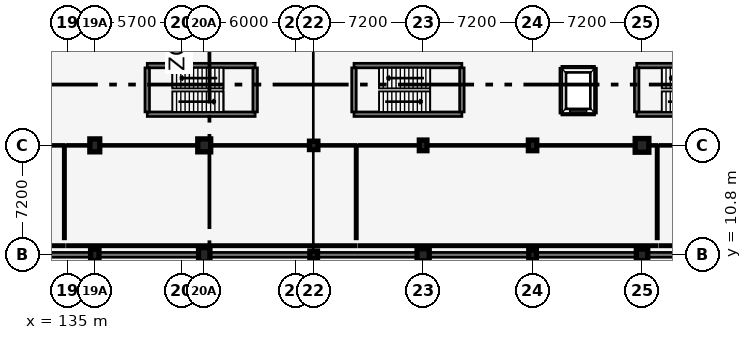
"""IFC4 building model, lengths in metres.
Left out: names, types, materials, properties, quantities, classifications, styles, units other than length and angle.
Written with IfcOpenShell. Run it as: python <this file> out.ifc"""

import sys

from ifc_helpers import new_model, si_unit, direction, frame, frame_2d, origin, origin_2d, place, context, subcontext, project, spatial, rectangle, circle, extrude, element, fill, save


model = new_model("IFC4")
c1 = context("Model", 3, precision=1e-05, world=origin(), true_north=direction((0.0, 1.0)))
c2 = subcontext(c1, "Body", "Model", "MODEL_VIEW")
j1 = project(units=[si_unit("LENGTHUNIT", "METRE"), si_unit("PLANEANGLEUNIT", "RADIAN")], contexts=[c1])
p1 = place(None, origin())
s1 = spatial("IfcSite", under=j1, at=p1, CompositionType="ELEMENT")
p2 = place(p1, origin())
s2 = spatial("IfcBuilding", under=s1, at=p2, CompositionType="ELEMENT")
p3 = place(p2, origin())
s3 = spatial("IfcBuildingStorey", under=s2, at=p3, CompositionType="ELEMENT", Elevation=0.0)
p4 = place(p3, frame((136.8, 10.8, 0.0), z_axis=(0.0, 0.0, 1.0), x_axis=(1.0, 0.0, 0.0)))
e1 = element("IfcColumn", 1, at=p4, inside=s3, PredefinedType="COLUMN", context=c2, shape_type="SweptSolid", body=[
    extrude(rectangle(XDim=0.55, YDim=0.75, at=origin_2d()), origin(), (0.0, 0.0, 1.0), 4.8),
])
p5 = place(p3, frame((136.8, 18.0, 0.0), z_axis=(0.0, 0.0, 1.0), x_axis=(1.0, 0.0, 0.0)))
e2 = element("IfcColumn", 2, at=p5, inside=s3, PredefinedType="COLUMN", context=c2, shape_type="SweptSolid", body=[
    extrude(rectangle(XDim=0.65, YDim=0.85, at=origin_2d()), origin(), (0.0, 0.0, 1.0), 4.8),
])
p6 = place(p3, frame((144.0, 10.8, 0.0), z_axis=(0.0, 0.0, 1.0), x_axis=(1.0, 0.0, 0.0)))
e3 = element("IfcColumn", 3, at=p6, inside=s3, PredefinedType="COLUMN", context=c2, shape_type="SweptSolid", body=[
    extrude(rectangle(XDim=0.75, YDim=0.95, at=origin_2d()), origin(), (0.0, 0.0, 1.0), 4.8),
])
p7 = place(p3, frame((144.0, 18.0, 0.0), z_axis=(0.0, 0.0, 1.0), x_axis=(1.0, 0.0, 0.0)))
e4 = element("IfcColumn", 4, at=p7, inside=s3, PredefinedType="COLUMN", context=c2, shape_type="SweptSolid", body=[
    extrude(rectangle(XDim=0.85, YDim=0.85, at=origin_2d()), origin(), (0.0, 0.0, 1.0), 4.8),
])
p8 = place(p3, frame((151.2, 10.8, 0.0), z_axis=(0.0, 0.0, 1.0), x_axis=(1.0, 0.0, 0.0)))
e5 = element("IfcColumn", 5, at=p8, inside=s3, PredefinedType="COLUMN", context=c2, shape_type="SweptSolid", body=[
    extrude(rectangle(XDim=0.5, YDim=0.5, at=origin_2d()), origin(), (0.0, 0.0, 1.0), 4.8),
])
p9 = place(p3, frame((151.2, 18.0, 0.0), z_axis=(0.0, 0.0, 1.0), x_axis=(1.0, 0.0, 0.0)))
e6 = element("IfcColumn", 6, at=p9, inside=s3, PredefinedType="COLUMN", context=c2, shape_type="SweptSolid", body=[
    extrude(rectangle(XDim=0.55, YDim=0.55, at=origin_2d()), origin(), (0.0, 0.0, 1.0), 4.8),
])
p10 = place(p3, frame((158.4, 10.8, 0.0), z_axis=(0.0, 0.0, 1.0), x_axis=(1.0, 0.0, 0.0)))
e7 = element("IfcColumn", 7, at=p10, inside=s3, PredefinedType="COLUMN", context=c2, shape_type="SweptSolid", body=[
    extrude(rectangle(XDim=0.8, YDim=0.8, at=origin_2d()), origin(), (0.0, 0.0, 1.0), 4.8),
])
p11 = place(p3, frame((158.4, 18.0, 0.0), z_axis=(0.0, 0.0, 1.0), x_axis=(1.0, 0.0, 0.0)))
e8 = element("IfcColumn", 8, at=p11, inside=s3, PredefinedType="COLUMN", context=c2, shape_type="SweptSolid", body=[
    extrude(rectangle(XDim=0.5, YDim=0.7, at=origin_2d()), origin(), (0.0, 0.0, 1.0), 4.8),
])
p12 = place(p3, frame((165.6, 10.8, 0.0), z_axis=(0.0, 0.0, 1.0), x_axis=(1.0, 0.0, 0.0)))
e9 = element("IfcColumn", 9, at=p12, inside=s3, PredefinedType="COLUMN", context=c2, shape_type="SweptSolid", body=[
    extrude(rectangle(XDim=0.5, YDim=0.65, at=origin_2d()), origin(), (0.0, 0.0, 1.0), 4.8),
])
p13 = place(p3, frame((165.6, 18.0, 0.0), z_axis=(0.0, 0.0, 1.0), x_axis=(1.0, 0.0, 0.0)))
e10 = element("IfcColumn", 10, at=p13, inside=s3, PredefinedType="COLUMN", context=c2, shape_type="SweptSolid", body=[
    extrude(rectangle(XDim=0.55, YDim=0.7, at=origin_2d()), origin(), (0.0, 0.0, 1.0), 4.8),
])
p14 = place(p3, frame((172.8, 10.8, 0.0), z_axis=(0.0, 0.0, 1.0), x_axis=(1.0, 0.0, 0.0)))
e11 = element("IfcColumn", 11, at=p14, inside=s3, PredefinedType="COLUMN", context=c2, shape_type="SweptSolid", body=[
    extrude(circle(Radius=0.375, at=origin_2d()), origin(), (0.0, 0.0, 1.0), 4.8),
])
p15 = place(p3, frame((172.8, 18.0, 0.0), z_axis=(0.0, 0.0, 1.0), x_axis=(1.0, 0.0, 0.0)))
e12 = element("IfcColumn", 12, at=p15, inside=s3, PredefinedType="COLUMN", context=c2, shape_type="SweptSolid", body=[
    extrude(circle(Radius=0.45, at=origin_2d()), origin(), (0.0, 0.0, 1.0), 4.8),
])
p16 = place(p3, frame((108.0, 10.8, 0.0), z_axis=(0.0, 0.0, 1.0), x_axis=(1.0, 0.0, 0.0)))
e13 = element("IfcWall", 13, at=p16, inside=s3, PredefinedType="SOLIDWALL", context=c2, shape_type="SweptSolid", body=[
    extrude(rectangle(XDim=79.2, YDim=0.32, at=frame_2d((39.6, 0.0))), origin(), (0.0, 0.0, 1.0), 4.25),
])
p17 = place(p16, frame((2.2, 0.0, 0.72)))
e14 = element("IfcOpeningElement", 14, at=p17, cuts=e13, PredefinedType="OPENING", context=c2, shape_type="SweptSolid", body=[
    extrude(rectangle(XDim=1.8, YDim=2.15, at=frame_2d((0.9, 1.075))), frame((0.0, 0.17, 0.0), z_axis=(0.0, -1.0, 0.0), x_axis=(1.0, 0.0, 0.0)), (0.0, 0.0, 1.0), 0.34),
])
p18 = place(p16, frame((9.4, 0.0, 0.72)))
e15 = element("IfcOpeningElement", 15, at=p18, cuts=e13, PredefinedType="OPENING", context=c2, shape_type="SweptSolid", body=[
    extrude(rectangle(XDim=1.2, YDim=2.0, at=frame_2d((0.6, 1.0))), frame((0.0, 0.17, 0.0), z_axis=(0.0, -1.0, 0.0), x_axis=(1.0, 0.0, 0.0)), (0.0, 0.0, 1.0), 0.34),
])
p19 = place(p16, frame((16.6, 0.0, 0.72)))
e16 = element("IfcOpeningElement", 16, at=p19, cuts=e13, PredefinedType="OPENING", context=c2, shape_type="SweptSolid", body=[
    extrude(rectangle(XDim=1.35, YDim=2.05, at=frame_2d((0.675, 1.025))), frame((0.0, 0.17, 0.0), z_axis=(0.0, -1.0, 0.0), x_axis=(1.0, 0.0, 0.0)), (0.0, 0.0, 1.0), 0.34),
])
p20 = place(p16, frame((23.8, 0.0, 0.72)))
e17 = element("IfcOpeningElement", 17, at=p20, cuts=e13, PredefinedType="OPENING", context=c2, shape_type="SweptSolid", body=[
    extrude(rectangle(XDim=1.5, YDim=2.1, at=frame_2d((0.75, 1.05))), frame((0.0, 0.17, 0.0), z_axis=(0.0, -1.0, 0.0), x_axis=(1.0, 0.0, 0.0)), (0.0, 0.0, 1.0), 0.34),
])
p21 = place(p16, frame((31.0, 0.0, 0.72)))
e18 = element("IfcOpeningElement", 18, at=p21, cuts=e13, PredefinedType="OPENING", context=c2, shape_type="SweptSolid", body=[
    extrude(rectangle(XDim=1.65, YDim=2.1, at=frame_2d((0.825, 1.05))), frame((0.0, 0.17, 0.0), z_axis=(0.0, -1.0, 0.0), x_axis=(1.0, 0.0, 0.0)), (0.0, 0.0, 1.0), 0.34),
])
p22 = place(p16, frame((38.2, 0.0, 0.72)))
e19 = element("IfcOpeningElement", 19, at=p22, cuts=e13, PredefinedType="OPENING", context=c2, shape_type="SweptSolid", body=[
    extrude(rectangle(XDim=1.8, YDim=2.15, at=frame_2d((0.9, 1.075))), frame((0.0, 0.17, 0.0), z_axis=(0.0, -1.0, 0.0), x_axis=(1.0, 0.0, 0.0)), (0.0, 0.0, 1.0), 0.34),
])
p23 = place(p16, frame((45.4, 0.0, 0.72)))
e20 = element("IfcOpeningElement", 20, at=p23, cuts=e13, PredefinedType="OPENING", context=c2, shape_type="SweptSolid", body=[
    extrude(rectangle(XDim=1.2, YDim=2.0, at=frame_2d((0.6, 1.0))), frame((0.0, 0.17, 0.0), z_axis=(0.0, -1.0, 0.0), x_axis=(1.0, 0.0, 0.0)), (0.0, 0.0, 1.0), 0.34),
])
p24 = place(p16, frame((52.6, 0.0, 0.72)))
e21 = element("IfcOpeningElement", 21, at=p24, cuts=e13, PredefinedType="OPENING", context=c2, shape_type="SweptSolid", body=[
    extrude(rectangle(XDim=1.35, YDim=2.05, at=frame_2d((0.675, 1.025))), frame((0.0, 0.17, 0.0), z_axis=(0.0, -1.0, 0.0), x_axis=(1.0, 0.0, 0.0)), (0.0, 0.0, 1.0), 0.34),
])
p25 = place(p16, frame((59.8, 0.0, 0.72)))
e22 = element("IfcOpeningElement", 22, at=p25, cuts=e13, PredefinedType="OPENING", context=c2, shape_type="SweptSolid", body=[
    extrude(rectangle(XDim=1.5, YDim=2.1, at=frame_2d((0.75, 1.05))), frame((0.0, 0.17, 0.0), z_axis=(0.0, -1.0, 0.0), x_axis=(1.0, 0.0, 0.0)), (0.0, 0.0, 1.0), 0.34),
])
p26 = place(p16, frame((67.0, 0.0, 0.72)))
e23 = element("IfcOpeningElement", 23, at=p26, cuts=e13, PredefinedType="OPENING", context=c2, shape_type="SweptSolid", body=[
    extrude(rectangle(XDim=1.65, YDim=2.1, at=frame_2d((0.825, 1.05))), frame((0.0, 0.17, 0.0), z_axis=(0.0, -1.0, 0.0), x_axis=(1.0, 0.0, 0.0)), (0.0, 0.0, 1.0), 0.34),
])
p27 = place(p3, frame((140.25, 20.05, 0.0), z_axis=(0.0, 0.0, 1.0), x_axis=(1.0, 0.0, 0.0)))
e24 = element("IfcWall", 24, at=p27, inside=s3, PredefinedType="SHEAR", context=c2, shape_type="SweptSolid", body=[
    extrude(rectangle(XDim=7.1, YDim=0.3, at=frame_2d((3.55, 0.0))), origin(), (0.0, 0.0, 1.0), 4.525),
])
p28 = place(p27, frame((0.35, 0.0, 0.0)))
e25 = element("IfcOpeningElement", 25, at=p28, cuts=e24, PredefinedType="OPENING", context=c2, shape_type="SweptSolid", body=[
    extrude(rectangle(XDim=1.05, YDim=2.15, at=frame_2d((0.525, 1.075))), frame((0.0, 0.16, 0.0), z_axis=(0.0, -1.0, 0.0), x_axis=(1.0, 0.0, 0.0)), (0.0, 0.0, 1.0), 0.32),
])
p29 = place(p3, frame((147.35, 23.25, 0.0), z_axis=(0.0, 0.0, 1.0), x_axis=(-1.0, 0.0, 0.0)))
e26 = element("IfcWall", 26, at=p29, inside=s3, PredefinedType="SHEAR", context=c2, shape_type="SweptSolid", body=[
    extrude(rectangle(XDim=7.1, YDim=0.3, at=frame_2d((3.55, 0.0))), origin(), (0.0, 0.0, 1.0), 4.525),
])
for number, where, z_axis, x_axis in (
    (27, (147.35, 20.2, 0.0), (0.0, 0.0, 1.0), (0.0, 1.0, 0.0)),
    (28, (140.25, 23.1, 0.0), (0.0, 0.0, 1.0), (0.0, -1.0, 0.0)),
):
    element("IfcWall", number, at=place(p3, frame(where, z_axis=z_axis, x_axis=x_axis)), inside=s3, PredefinedType="SHEAR", context=c2, shape_type="SweptSolid", body=[
        extrude(rectangle(XDim=2.9, YDim=0.3, at=frame_2d((1.45, 0.0))), origin(), (0.0, 0.0, 1.0), 4.525),
    ])
p30 = place(p3, frame((153.85, 20.05, 0.0), z_axis=(0.0, 0.0, 1.0), x_axis=(1.0, 0.0, 0.0)))
e29 = element("IfcWall", 29, at=p30, inside=s3, PredefinedType="SHEAR", context=c2, shape_type="SweptSolid", body=[
    extrude(rectangle(XDim=7.1, YDim=0.3, at=frame_2d((3.55, 0.0))), origin(), (0.0, 0.0, 1.0), 4.525),
])
p31 = place(p30, frame((0.35, 0.0, 0.0)))
e30 = element("IfcOpeningElement", 30, at=p31, cuts=e29, PredefinedType="OPENING", context=c2, shape_type="SweptSolid", body=[
    extrude(rectangle(XDim=1.05, YDim=2.15, at=frame_2d((0.525, 1.075))), frame((0.0, 0.16, 0.0), z_axis=(0.0, -1.0, 0.0), x_axis=(1.0, 0.0, 0.0)), (0.0, 0.0, 1.0), 0.32),
])
p32 = place(p3, frame((160.95, 23.25, 0.0), z_axis=(0.0, 0.0, 1.0), x_axis=(-1.0, 0.0, 0.0)))
e31 = element("IfcWall", 31, at=p32, inside=s3, PredefinedType="SHEAR", context=c2, shape_type="SweptSolid", body=[
    extrude(rectangle(XDim=7.1, YDim=0.3, at=frame_2d((3.55, 0.0))), origin(), (0.0, 0.0, 1.0), 4.525),
])
for number, where, z_axis, x_axis in (
    (32, (160.95, 20.2, 0.0), (0.0, 0.0, 1.0), (0.0, 1.0, 0.0)),
    (33, (153.85, 23.1, 0.0), (0.0, 0.0, 1.0), (0.0, -1.0, 0.0)),
):
    element("IfcWall", number, at=place(p3, frame(where, z_axis=z_axis, x_axis=x_axis)), inside=s3, PredefinedType="SHEAR", context=c2, shape_type="SweptSolid", body=[
        extrude(rectangle(XDim=2.9, YDim=0.3, at=frame_2d((1.45, 0.0))), origin(), (0.0, 0.0, 1.0), 4.525),
    ])
p33 = place(p3, frame((172.45, 20.05, 0.0), z_axis=(0.0, 0.0, 1.0), x_axis=(1.0, 0.0, 0.0)))
e34 = element("IfcWall", 34, at=p33, inside=s3, PredefinedType="SHEAR", context=c2, shape_type="SweptSolid", body=[
    extrude(rectangle(XDim=7.1, YDim=0.3, at=frame_2d((3.55, 0.0))), origin(), (0.0, 0.0, 1.0), 4.525),
])
p34 = place(p33, frame((0.35, 0.0, 0.0)))
e35 = element("IfcOpeningElement", 35, at=p34, cuts=e34, PredefinedType="OPENING", context=c2, shape_type="SweptSolid", body=[
    extrude(rectangle(XDim=1.05, YDim=2.15, at=frame_2d((0.525, 1.075))), frame((0.0, 0.16, 0.0), z_axis=(0.0, -1.0, 0.0), x_axis=(1.0, 0.0, 0.0)), (0.0, 0.0, 1.0), 0.32),
])
p35 = place(p3, frame((179.55, 23.25, 0.0), z_axis=(0.0, 0.0, 1.0), x_axis=(-1.0, 0.0, 0.0)))
e36 = element("IfcWall", 36, at=p35, inside=s3, PredefinedType="SHEAR", context=c2, shape_type="SweptSolid", body=[
    extrude(rectangle(XDim=7.1, YDim=0.3, at=frame_2d((3.55, 0.0))), origin(), (0.0, 0.0, 1.0), 4.525),
])
p36 = place(p3, frame((172.45, 23.1, 0.0), z_axis=(0.0, 0.0, 1.0), x_axis=(0.0, -1.0, 0.0)))
e37 = element("IfcWall", 37, at=p36, inside=s3, PredefinedType="SHEAR", context=c2, shape_type="SweptSolid", body=[
    extrude(rectangle(XDim=2.9, YDim=0.3, at=frame_2d((1.45, 0.0))), origin(), (0.0, 0.0, 1.0), 4.525),
])
p37 = place(p3, frame((167.525, 20.125, 0.0), z_axis=(0.0, 0.0, 1.0), x_axis=(1.0, 0.0, 0.0)))
e38 = element("IfcWall", 38, at=p37, inside=s3, PredefinedType="SHEAR", context=c2, shape_type="SweptSolid", body=[
    extrude(rectangle(XDim=2.15, YDim=0.25, at=frame_2d((1.075, 0.0))), origin(), (0.0, 0.0, 1.0), 4.5),
])
p38 = place(p3, frame((169.675, 23.075, 0.0), z_axis=(0.0, 0.0, 1.0), x_axis=(-1.0, 0.0, 0.0)))
e39 = element("IfcWall", 39, at=p38, inside=s3, PredefinedType="SHEAR", context=c2, shape_type="SweptSolid", body=[
    extrude(rectangle(XDim=2.15, YDim=0.25, at=frame_2d((1.075, 0.0))), origin(), (0.0, 0.0, 1.0), 4.5),
])
p39 = place(p38, frame((0.525, 0.0, 0.0)))
e40 = element("IfcOpeningElement", 40, at=p39, cuts=e39, PredefinedType="OPENING", context=c2, shape_type="SweptSolid", body=[
    extrude(rectangle(XDim=1.1, YDim=2.15, at=frame_2d((0.55, 1.075))), frame((0.0, 0.135, 0.0), z_axis=(0.0, -1.0, 0.0), x_axis=(1.0, 0.0, 0.0)), (0.0, 0.0, 1.0), 0.27),
])
for number, where, z_axis, x_axis in (
    (41, (167.525, 23.075, 0.0), (0.0, 0.0, 1.0), (0.0, -1.0, 0.0)),
    (42, (169.675, 20.125, 0.0), (0.0, 0.0, 1.0), (0.0, 1.0, 0.0)),
):
    element("IfcWall", number, at=place(p3, frame(where, z_axis=z_axis, x_axis=x_axis)), inside=s3, PredefinedType="SHEAR", context=c2, shape_type="SweptSolid", body=[
        extrude(rectangle(XDim=2.95, YDim=0.25, at=frame_2d((1.475, 0.0))), origin(), (0.0, 0.0, 1.0), 4.5),
    ])
p40 = place(p3, frame((134.8, 11.4, 0.0), z_axis=(0.0, 0.0, 1.0), x_axis=(-1.0, 0.0, 0.0)))
e43 = element("IfcWall", 43, at=p40, inside=s3, PredefinedType="PARTITIONING", context=c2, shape_type="SweptSolid", body=[
    extrude(rectangle(XDim=16.2, YDim=0.15, at=frame_2d((8.1, 0.0))), origin(), (0.0, 0.0, 1.0), 3.557),
])
p41 = place(p3, frame((134.8, 11.85, 0.0), z_axis=(0.0, 0.0, 1.0), x_axis=(0.0, 1.0, 0.0)))
e44 = element("IfcWall", 44, at=p41, inside=s3, PredefinedType="PARTITIONING", context=c2, shape_type="SweptSolid", body=[
    extrude(rectangle(XDim=6.15, YDim=0.15, at=frame_2d((3.075, 0.0))), origin(), (0.0, 0.0, 1.0), 3.757),
])
p42 = place(p3, frame((118.6, 18.0, 0.0), z_axis=(0.0, 0.0, 1.0), x_axis=(1.0, 0.0, 0.0)))
e45 = element("IfcWall", 45, at=p42, inside=s3, PredefinedType="PARTITIONING", context=c2, shape_type="SweptSolid", body=[
    extrude(rectangle(XDim=16.2, YDim=0.125, at=frame_2d((8.1, 0.0))), origin(), (0.0, 0.0, 1.0), 3.757),
])
p43 = place(p42, frame((7.62, 0.0, 0.0)))
e46 = element("IfcOpeningElement", 46, at=p43, cuts=e45, PredefinedType="OPENING", context=c2, shape_type="SweptSolid", body=[
    extrude(rectangle(XDim=0.96, YDim=2.15, at=frame_2d((0.48, 1.075))), frame((0.0, 0.073, 0.0), z_axis=(0.0, -1.0, 0.0), x_axis=(1.0, 0.0, 0.0)), (0.0, 0.0, 1.0), 0.145),
])
p44 = place(p3, frame((154.0, 11.4, 0.0), z_axis=(0.0, 0.0, 1.0), x_axis=(-1.0, 0.0, 0.0)))
e47 = element("IfcWall", 47, at=p44, inside=s3, PredefinedType="PARTITIONING", context=c2, shape_type="SweptSolid", body=[
    extrude(rectangle(XDim=19.0, YDim=0.15, at=frame_2d((9.5, 0.0))), origin(), (0.0, 0.0, 1.0), 3.857),
])
p45 = place(p3, frame((154.0, 11.85, 0.0), z_axis=(0.0, 0.0, 1.0), x_axis=(0.0, 1.0, 0.0)))
e48 = element("IfcWall", 48, at=p45, inside=s3, PredefinedType="PARTITIONING", context=c2, shape_type="SweptSolid", body=[
    extrude(rectangle(XDim=6.15, YDim=0.15, at=frame_2d((3.075, 0.0))), origin(), (0.0, 0.0, 1.0), 3.657),
])
p46 = place(p3, frame((135.0, 18.0, 0.0), z_axis=(0.0, 0.0, 1.0), x_axis=(1.0, 0.0, 0.0)))
e49 = element("IfcWall", 49, at=p46, inside=s3, PredefinedType="PARTITIONING", context=c2, shape_type="SweptSolid", body=[
    extrude(rectangle(XDim=19.0, YDim=0.125, at=frame_2d((9.5, 0.0))), origin(), (0.0, 0.0, 1.0), 3.657),
])
p47 = place(p46, frame((5.16, 0.0, 0.0)))
e50 = element("IfcOpeningElement", 50, at=p47, cuts=e49, PredefinedType="OPENING", context=c2, shape_type="SweptSolid", body=[
    extrude(rectangle(XDim=1.8, YDim=2.2, at=frame_2d((0.9, 1.1))), frame((0.0, 0.073, 0.0), z_axis=(0.0, -1.0, 0.0), x_axis=(1.0, 0.0, 0.0)), (0.0, 0.0, 1.0), 0.145),
])
p48 = place(p3, frame((173.8, 11.4, 0.0), z_axis=(0.0, 0.0, 1.0), x_axis=(-1.0, 0.0, 0.0)))
e51 = element("IfcWall", 51, at=p48, inside=s3, PredefinedType="PARTITIONING", context=c2, shape_type="SweptSolid", body=[
    extrude(rectangle(XDim=19.6, YDim=0.15, at=frame_2d((9.8, 0.0))), origin(), (0.0, 0.0, 1.0), 3.557),
])
p49 = place(p3, frame((173.8, 11.85, 0.0), z_axis=(0.0, 0.0, 1.0), x_axis=(0.0, 1.0, 0.0)))
e52 = element("IfcWall", 52, at=p49, inside=s3, PredefinedType="PARTITIONING", context=c2, shape_type="SweptSolid", body=[
    extrude(rectangle(XDim=6.15, YDim=0.15, at=frame_2d((3.075, 0.0))), origin(), (0.0, 0.0, 1.0), 3.507),
])
p50 = place(p3, frame((154.2, 18.0, 0.0), z_axis=(0.0, 0.0, 1.0), x_axis=(1.0, 0.0, 0.0)))
e53 = element("IfcWall", 53, at=p50, inside=s3, PredefinedType="PARTITIONING", context=c2, shape_type="SweptSolid", body=[
    extrude(rectangle(XDim=19.6, YDim=0.125, at=frame_2d((9.8, 0.0))), origin(), (0.0, 0.0, 1.0), 3.507),
])
p51 = place(p50, frame((9.32, 0.0, 0.0)))
e54 = element("IfcOpeningElement", 54, at=p51, cuts=e53, PredefinedType="OPENING", context=c2, shape_type="SweptSolid", body=[
    extrude(rectangle(XDim=0.96, YDim=2.15, at=frame_2d((0.48, 1.075))), frame((0.0, 0.073, 0.0), z_axis=(0.0, -1.0, 0.0), x_axis=(1.0, 0.0, 0.0)), (0.0, 0.0, 1.0), 0.145),
])
p52 = place(p3, frame((186.2, 11.4, 0.0), z_axis=(0.0, 0.0, 1.0), x_axis=(-1.0, 0.0, 0.0)))
e55 = element("IfcWall", 55, at=p52, inside=s3, PredefinedType="PARTITIONING", context=c2, shape_type="SweptSolid", body=[
    extrude(rectangle(XDim=12.2, YDim=0.15, at=frame_2d((6.1, 0.0))), origin(), (0.0, 0.0, 1.0), 3.657),
])
p53 = place(p3, frame((174.0, 18.0, 0.0), z_axis=(0.0, 0.0, 1.0), x_axis=(1.0, 0.0, 0.0)))
e56 = element("IfcWall", 56, at=p53, inside=s3, PredefinedType="PARTITIONING", context=c2, shape_type="SweptSolid", body=[
    extrude(rectangle(XDim=12.2, YDim=0.125, at=frame_2d((6.1, 0.0))), origin(), (0.0, 0.0, 1.0), 3.507),
])
p54 = place(p53, frame((3.369, 0.0, 0.0)))
e57 = element("IfcOpeningElement", 57, at=p54, cuts=e56, PredefinedType="OPENING", context=c2, shape_type="SweptSolid", body=[
    extrude(rectangle(XDim=0.97, YDim=2.15, at=frame_2d((0.485, 1.075))), frame((0.0, 0.073, 0.0), z_axis=(0.0, -1.0, 0.0), x_axis=(1.0, 0.0, 0.0)), (0.0, 0.0, 1.0), 0.145),
])
p55 = place(p21, origin())
e58 = element("IfcWindow", 58, at=p55, inside=s3, PartitioningType="SINGLE_PANEL", PredefinedType="WINDOW", context=c2, shape_type="SweptSolid", body=[
    extrude(rectangle(XDim=1.65, YDim=2.1, at=frame_2d((0.825, 1.05))), frame((0.0, 0.03, 0.0), z_axis=(0.0, -1.0, 0.0), x_axis=(1.0, 0.0, 0.0)), (0.0, 0.0, 1.0), 0.06),
])
fill(e18, e58)
p56 = place(p22, origin())
e59 = element("IfcWindow", 59, at=p56, inside=s3, PartitioningType="SINGLE_PANEL", PredefinedType="WINDOW", context=c2, shape_type="SweptSolid", body=[
    extrude(rectangle(XDim=1.8, YDim=2.15, at=frame_2d((0.9, 1.075))), frame((0.0, 0.03, 0.0), z_axis=(0.0, -1.0, 0.0), x_axis=(1.0, 0.0, 0.0)), (0.0, 0.0, 1.0), 0.06),
])
fill(e19, e59)
p57 = place(p23, origin())
e60 = element("IfcWindow", 60, at=p57, inside=s3, PartitioningType="SINGLE_PANEL", PredefinedType="WINDOW", context=c2, shape_type="SweptSolid", body=[
    extrude(rectangle(XDim=1.2, YDim=2.0, at=frame_2d((0.6, 1.0))), frame((0.0, 0.03, 0.0), z_axis=(0.0, -1.0, 0.0), x_axis=(1.0, 0.0, 0.0)), (0.0, 0.0, 1.0), 0.06),
])
fill(e20, e60)
p58 = place(p24, origin())
e61 = element("IfcWindow", 61, at=p58, inside=s3, PartitioningType="SINGLE_PANEL", PredefinedType="WINDOW", context=c2, shape_type="SweptSolid", body=[
    extrude(rectangle(XDim=1.35, YDim=2.05, at=frame_2d((0.675, 1.025))), frame((0.0, 0.03, 0.0), z_axis=(0.0, -1.0, 0.0), x_axis=(1.0, 0.0, 0.0)), (0.0, 0.0, 1.0), 0.06),
])
fill(e21, e61)
p59 = place(p25, origin())
e62 = element("IfcWindow", 62, at=p59, inside=s3, PartitioningType="SINGLE_PANEL", PredefinedType="WINDOW", context=c2, shape_type="SweptSolid", body=[
    extrude(rectangle(XDim=1.5, YDim=2.1, at=frame_2d((0.75, 1.05))), frame((0.0, 0.03, 0.0), z_axis=(0.0, -1.0, 0.0), x_axis=(1.0, 0.0, 0.0)), (0.0, 0.0, 1.0), 0.06),
])
fill(e22, e62)
p60 = place(p28, frame((1.05, 0.0, 0.0), z_axis=(0.0, 0.0, 1.0), x_axis=(-1.0, 0.0, 0.0)))
e63 = element("IfcDoor", 63, at=p60, inside=s3, OperationType="SINGLE_SWING_LEFT", PredefinedType="DOOR", context=c2, shape_type="SweptSolid", body=[
    extrude(rectangle(XDim=1.05, YDim=2.15, at=frame_2d((0.525, 1.075))), frame((0.0, 0.025, 0.0), z_axis=(0.0, -1.0, 0.0), x_axis=(1.0, 0.0, 0.0)), (0.0, 0.0, 1.0), 0.05),
])
fill(e25, e63)
p61 = place(p31, frame((1.05, 0.0, 0.0), z_axis=(0.0, 0.0, 1.0), x_axis=(-1.0, 0.0, 0.0)))
e64 = element("IfcDoor", 64, at=p61, inside=s3, OperationType="SINGLE_SWING_LEFT", PredefinedType="DOOR", context=c2, shape_type="SweptSolid", body=[
    extrude(rectangle(XDim=1.05, YDim=2.15, at=frame_2d((0.525, 1.075))), frame((0.0, 0.025, 0.0), z_axis=(0.0, -1.0, 0.0), x_axis=(1.0, 0.0, 0.0)), (0.0, 0.0, 1.0), 0.05),
])
fill(e30, e64)
p62 = place(p34, frame((1.05, 0.0, 0.0), z_axis=(0.0, 0.0, 1.0), x_axis=(-1.0, 0.0, 0.0)))
e65 = element("IfcDoor", 65, at=p62, inside=s3, OperationType="SINGLE_SWING_LEFT", PredefinedType="DOOR", context=c2, shape_type="SweptSolid", body=[
    extrude(rectangle(XDim=1.05, YDim=2.15, at=frame_2d((0.525, 1.075))), frame((0.0, 0.025, 0.0), z_axis=(0.0, -1.0, 0.0), x_axis=(1.0, 0.0, 0.0)), (0.0, 0.0, 1.0), 0.05),
])
fill(e35, e65)
p63 = place(p39, origin())
e66 = element("IfcDoor", 66, at=p63, inside=s3, OperationType="SLIDING_TO_LEFT", PredefinedType="DOOR", context=c2, shape_type="SweptSolid", body=[
    extrude(rectangle(XDim=1.1, YDim=2.15, at=frame_2d((0.55, 1.075))), frame((0.0, 0.025, 0.0), z_axis=(0.0, -1.0, 0.0), x_axis=(1.0, 0.0, 0.0)), (0.0, 0.0, 1.0), 0.05),
])
fill(e40, e66)
p64 = place(p47, origin())
e67 = element("IfcDoor", 67, at=p64, inside=s3, OperationType="DOUBLE_SWING_RIGHT", PredefinedType="DOOR", context=c2, shape_type="SweptSolid", body=[
    extrude(rectangle(XDim=1.8, YDim=2.2, at=frame_2d((0.9, 1.1))), frame((0.0, 0.025, 0.0), z_axis=(0.0, -1.0, 0.0), x_axis=(1.0, 0.0, 0.0)), (0.0, 0.0, 1.0), 0.05),
])
fill(e50, e67)
p65 = place(p51, origin())
e68 = element("IfcDoor", 68, at=p65, inside=s3, OperationType="SINGLE_SWING_LEFT", PredefinedType="DOOR", context=c2, shape_type="SweptSolid", body=[
    extrude(rectangle(XDim=0.96, YDim=2.15, at=frame_2d((0.48, 1.075))), frame((0.0, 0.025, 0.0), z_axis=(0.0, -1.0, 0.0), x_axis=(1.0, 0.0, 0.0)), (0.0, 0.0, 1.0), 0.05),
])
fill(e54, e68)
save(model, sys.argv[1])
